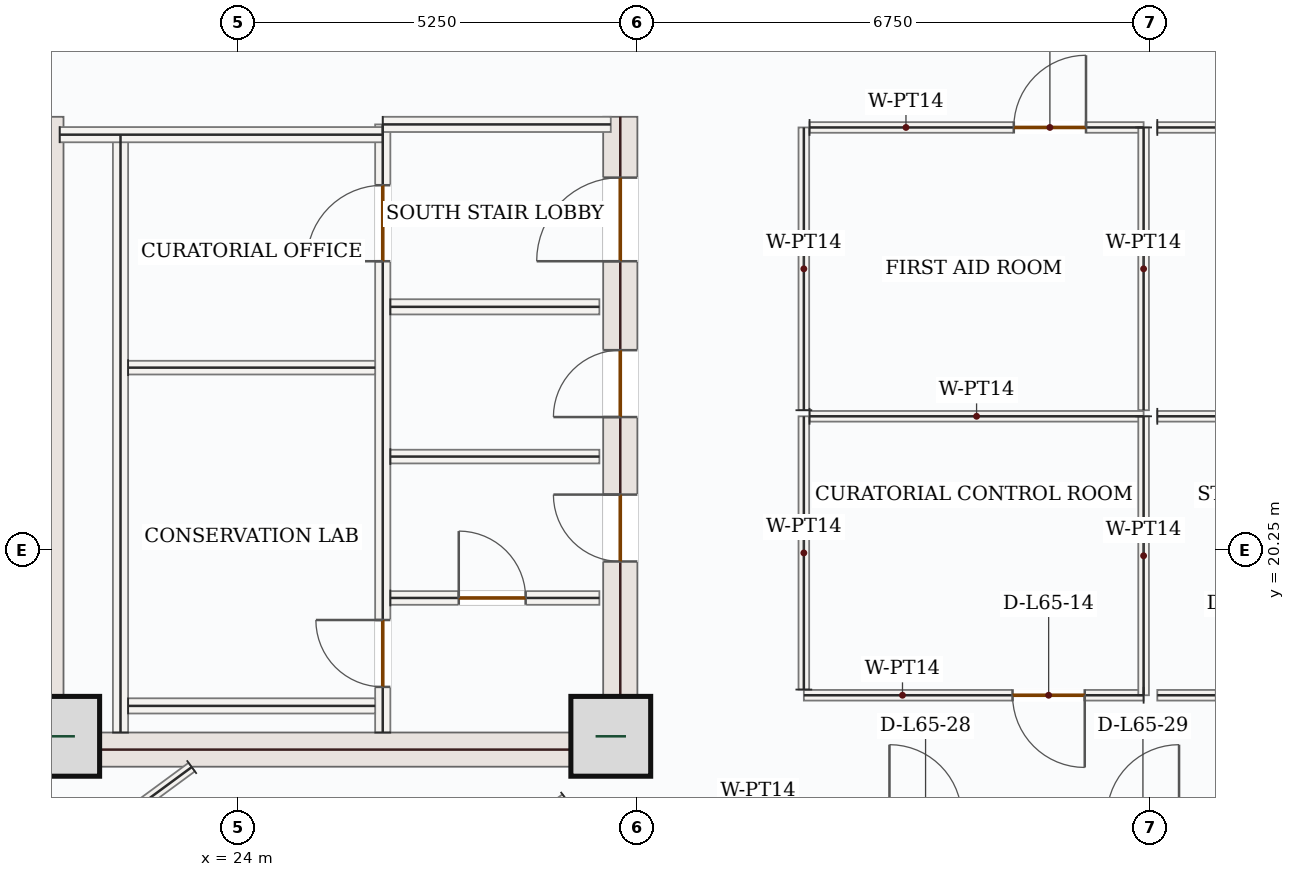
"""IFC4 building model, lengths in metres.
Left out: names, types, materials, properties, quantities, classifications, styles, units other than length and angle.
Written with IfcOpenShell. Run it as: python <this file> out.ifc"""

import sys

from ifc_helpers import new_model, si_unit, direction, frame, frame_2d, origin, origin_2d, place, context, subcontext, project, spatial, rectangle, extrude, source, transform, mapped, element, fill, save


model = new_model("IFC4")
c1 = context("Model", 3, precision=1e-05, world=origin(), true_north=direction((0.0, 1.0)))
c2 = subcontext(c1, "Body", "Model", "MODEL_VIEW")
j1 = project(units=[si_unit("LENGTHUNIT", "METRE"), si_unit("PLANEANGLEUNIT", "RADIAN")], contexts=[c1])
p1 = place(None, origin())
s1 = spatial("IfcSite", under=j1, at=p1, CompositionType="ELEMENT")
p2 = place(p1, origin())
s2 = spatial("IfcBuilding", under=s1, at=p2, CompositionType="ELEMENT")
p3 = place(p2, frame((0.0, 0.0, 272.85)))
s3 = spatial("IfcBuildingStorey", under=s2, at=p3, CompositionType="ELEMENT", Elevation=272.85)
m1 = source(origin(), c2, "Body", "SweptSolid", [
    extrude(rectangle(XDim=8.55, YDim=0.45, at=frame_2d((4.275, 0.0))), origin(), (0.0, 0.0, 1.0), 3.5),
])
p4 = place(p3, frame((21.475, 17.4, 0.0), z_axis=(0.0, 0.0, 1.0), x_axis=(0.0, 1.0, 0.0)))
e1 = element("IfcWall", 1, at=p4, inside=s3, PredefinedType="SHEAR", context=c2, shape_type="MappedRepresentation", body=[
    mapped(m1, transform((0.0, 0.0, 0.0), x_axis=(1.0, 0.0, 0.0), y_axis=(0.0, 1.0, 0.0), z_axis=(0.0, 0.0, 1.0), scale=1.0)),
])
p5 = place(p3, frame((29.025, 17.4, 0.0), z_axis=(0.0, 0.0, 1.0), x_axis=(0.0, 1.0, 0.0)))
e2 = element("IfcWall", 2, at=p5, inside=s3, PredefinedType="SHEAR", context=c2, shape_type="SweptSolid", body=[
    extrude(rectangle(XDim=8.55, YDim=0.45, at=frame_2d((4.275, 0.0))), origin(), (0.0, 0.0, 1.0), 3.5),
])
p6 = place(p5, frame((6.65, 0.0, 0.0)))
e3 = element("IfcOpeningElement", 3, at=p6, cuts=e2, PredefinedType="OPENING", context=c2, shape_type="SweptSolid", body=[
    extrude(rectangle(XDim=1.1, YDim=2.2, at=frame_2d((0.55, 1.1))), frame((0.0, 0.235, 0.0), z_axis=(0.0, -1.0, 0.0), x_axis=(1.0, 0.0, 0.0)), (0.0, 0.0, 1.0), 0.47),
])
p7 = place(p5, frame((2.7, 0.0, 0.0)))
e4 = element("IfcOpeningElement", 4, at=p7, cuts=e2, PredefinedType="OPENING", context=c2, shape_type="SweptSolid", body=[
    extrude(rectangle(XDim=0.88, YDim=2.1, at=frame_2d((0.44, 1.05))), frame((0.0, 0.235, 0.0), z_axis=(0.0, -1.0, 0.0), x_axis=(1.0, 0.0, 0.0)), (0.0, 0.0, 1.0), 0.47),
])
p8 = place(p5, frame((4.6, 0.0, 0.0)))
e5 = element("IfcOpeningElement", 5, at=p8, cuts=e2, PredefinedType="OPENING", context=c2, shape_type="SweptSolid", body=[
    extrude(rectangle(XDim=0.88, YDim=2.1, at=frame_2d((0.44, 1.05))), frame((0.0, 0.235, 0.0), z_axis=(0.0, -1.0, 0.0), x_axis=(1.0, 0.0, 0.0)), (0.0, 0.0, 1.0), 0.47),
])
m2 = source(origin(), c2, "Body", "SweptSolid", [
    extrude(rectangle(XDim=7.1, YDim=0.45, at=frame_2d((3.55, 0.0))), origin(), (0.0, 0.0, 1.0), 3.5),
])
p9 = place(p3, frame((21.7, 17.625, 0.0), z_axis=(0.0, 0.0, 1.0), x_axis=(1.0, 0.0, 0.0)))
e6 = element("IfcWall", 6, at=p9, inside=s3, PredefinedType="SHEAR", context=c2, shape_type="MappedRepresentation", body=[
    mapped(m2, transform((0.0, 0.0, 0.0), x_axis=(1.0, 0.0, 0.0), y_axis=(0.0, 1.0, 0.0), z_axis=(0.0, 0.0, 1.0), scale=1.0)),
])
m3 = source(origin(), c2, "Body", "SweptSolid", [
    extrude(rectangle(XDim=1.05, YDim=1.05, at=origin_2d()), origin(), (0.0, 0.0, 1.0), 3.75),
])
for number, where, z_axis, x_axis in (
    (7, (21.65, 17.8, 0.0), (0.0, 0.0, 1.0), (1.0, 0.0, 0.0)),
    (8, (28.9, 17.8, 0.0), (0.0, 0.0, 1.0), (1.0, 0.0, 0.0)),
):
    element("IfcColumn", number, at=place(p3, frame(where, z_axis=z_axis, x_axis=x_axis)), inside=s3, PredefinedType="COLUMN", context=c2, shape_type="MappedRepresentation", body=[
        mapped(m3, transform((0.0, 0.0, 0.0), x_axis=(1.0, 0.0, 0.0), y_axis=(0.0, 1.0, 0.0), z_axis=(0.0, 0.0, 1.0), scale=1.0)),
    ])
m4 = source(origin(), c2, "Body", "SweptSolid", [
    extrude(rectangle(XDim=7.87, YDim=0.2, at=frame_2d((3.935, 0.0))), origin(), (0.0, 0.0, 1.0), 3.5),
])
p10 = place(p3, frame((22.45, 17.85, 0.0), z_axis=(0.0, 0.0, 1.0), x_axis=(0.0, 1.0, 0.0)))
e9 = element("IfcWall", 9, at=p10, inside=s3, PredefinedType="SOLIDWALL", context=c2, shape_type="MappedRepresentation", body=[
    mapped(m4, transform((0.0, 0.0, 0.0), x_axis=(1.0, 0.0, 0.0), y_axis=(0.0, 1.0, 0.0), z_axis=(0.0, 0.0, 1.0), scale=1.0)),
])
p11 = place(p3, frame((25.9, 17.85, 0.0), z_axis=(0.0, 0.0, 1.0), x_axis=(0.0, 1.0, 0.0)))
e10 = element("IfcWall", 10, at=p11, inside=s3, PredefinedType="SOLIDWALL", context=c2, shape_type="SweptSolid", body=[
    extrude(rectangle(XDim=8.0, YDim=0.2, at=frame_2d((4.0, 0.0))), origin(), (0.0, 0.0, 1.0), 3.5),
])
p12 = place(p11, frame((6.2, 0.0, 0.0)))
e11 = element("IfcOpeningElement", 11, at=p12, cuts=e10, PredefinedType="OPENING", context=c2, shape_type="SweptSolid", body=[
    extrude(rectangle(XDim=1.0, YDim=2.15, at=frame_2d((0.5, 1.075))), frame((0.0, 0.11, 0.0), z_axis=(0.0, -1.0, 0.0), x_axis=(1.0, 0.0, 0.0)), (0.0, 0.0, 1.0), 0.22),
])
p13 = place(p11, frame((0.6, 0.0, 0.0)))
e12 = element("IfcOpeningElement", 12, at=p13, cuts=e10, PredefinedType="OPENING", context=c2, shape_type="SweptSolid", body=[
    extrude(rectangle(XDim=0.88, YDim=2.1, at=frame_2d((0.44, 1.05))), frame((0.0, 0.11, 0.0), z_axis=(0.0, -1.0, 0.0), x_axis=(1.0, 0.0, 0.0)), (0.0, 0.0, 1.0), 0.22),
])
m5 = source(origin(), c2, "Body", "SweptSolid", [
    extrude(rectangle(XDim=4.25, YDim=0.2, at=frame_2d((2.125, 0.0))), origin(), (0.0, 0.0, 1.0), 3.5),
])
p14 = place(p3, frame((21.65, 25.715, 0.0), z_axis=(0.0, 0.0, 1.0), x_axis=(1.0, 0.0, 0.0)))
e13 = element("IfcWall", 13, at=p14, inside=s3, PredefinedType="SOLIDWALL", context=c2, shape_type="MappedRepresentation", body=[
    mapped(m5, transform((0.0, 0.0, 0.0), x_axis=(1.0, 0.0, 0.0), y_axis=(0.0, 1.0, 0.0), z_axis=(0.0, 0.0, 1.0), scale=1.0)),
])
m6 = source(origin(), c2, "Body", "SweptSolid", [
    extrude(rectangle(XDim=3.0, YDim=0.2, at=frame_2d((1.5, 0.0))), origin(), (0.0, 0.0, 1.0), 3.5),
])
p15 = place(p3, frame((25.9, 25.85, 0.0), z_axis=(0.0, 0.0, 1.0), x_axis=(1.0, 0.0, 0.0)))
e14 = element("IfcWall", 14, at=p15, inside=s3, PredefinedType="SOLIDWALL", context=c2, shape_type="MappedRepresentation", body=[
    mapped(m6, transform((0.0, 0.0, 0.0), x_axis=(1.0, 0.0, 0.0), y_axis=(0.0, 1.0, 0.0), z_axis=(0.0, 0.0, 1.0), scale=1.0)),
])
m7 = source(origin(), c2, "Body", "SweptSolid", [
    extrude(rectangle(XDim=3.25, YDim=0.2, at=frame_2d((1.625, 0.0))), origin(), (0.0, 0.0, 1.0), 3.5),
])
p16 = place(p3, frame((22.55, 18.2, 0.0), z_axis=(0.0, 0.0, 1.0), x_axis=(1.0, 0.0, 0.0)))
e15 = element("IfcWall", 15, at=p16, inside=s3, PredefinedType="SOLIDWALL", context=c2, shape_type="MappedRepresentation", body=[
    mapped(m7, transform((0.0, 0.0, 0.0), x_axis=(1.0, 0.0, 0.0), y_axis=(0.0, 1.0, 0.0), z_axis=(0.0, 0.0, 1.0), scale=1.0)),
])
m8 = source(origin(), c2, "Body", "SweptSolid", [
    extrude(rectangle(XDim=3.25, YDim=0.18, at=frame_2d((1.625, 0.0))), origin(), (0.0, 0.0, 1.0), 3.5),
])
p17 = place(p3, frame((22.55, 22.65, 0.0), z_axis=(0.0, 0.0, 1.0), x_axis=(1.0, 0.0, 0.0)))
e16 = element("IfcWall", 16, at=p17, inside=s3, PredefinedType="PARTITIONING", context=c2, shape_type="MappedRepresentation", body=[
    mapped(m8, transform((0.0, 0.0, 0.0), x_axis=(1.0, 0.0, 0.0), y_axis=(0.0, 1.0, 0.0), z_axis=(0.0, 0.0, 1.0), scale=1.0)),
])
m9 = source(origin(), c2, "Body", "SweptSolid", [
    extrude(rectangle(XDim=2.75, YDim=0.2, at=frame_2d((1.375, 0.0))), origin(), (0.0, 0.0, 1.0), 3.5),
])
p18 = place(p3, frame((26.0, 23.45, 0.0), z_axis=(0.0, 0.0, 1.0), x_axis=(1.0, 0.0, 0.0)))
e17 = element("IfcWall", 17, at=p18, inside=s3, PredefinedType="SOLIDWALL", context=c2, shape_type="MappedRepresentation", body=[
    mapped(m9, transform((0.0, 0.0, 0.0), x_axis=(1.0, 0.0, 0.0), y_axis=(0.0, 1.0, 0.0), z_axis=(0.0, 0.0, 1.0), scale=1.0)),
])
p19 = place(p3, frame((26.0, 19.62, 0.0), z_axis=(0.0, 0.0, 1.0), x_axis=(1.0, 0.0, 0.0)))
e18 = element("IfcWall", 18, at=p19, inside=s3, PredefinedType="PARTITIONING", context=c2, shape_type="SweptSolid", body=[
    extrude(rectangle(XDim=2.75, YDim=0.18, at=frame_2d((1.375, 0.0))), origin(), (0.0, 0.0, 1.0), 3.5),
])
p20 = place(p19, frame((0.9, 0.0, 0.0)))
e19 = element("IfcOpeningElement", 19, at=p20, cuts=e18, PredefinedType="OPENING", context=c2, shape_type="SweptSolid", body=[
    extrude(rectangle(XDim=0.88, YDim=2.1, at=frame_2d((0.44, 1.05))), frame((0.0, 0.1, 0.0), z_axis=(0.0, -1.0, 0.0), x_axis=(1.0, 0.0, 0.0)), (0.0, 0.0, 1.0), 0.2),
])
m10 = source(origin(), c2, "Body", "SweptSolid", [
    extrude(rectangle(XDim=2.75, YDim=0.18, at=frame_2d((1.375, 0.0))), origin(), (0.0, 0.0, 1.0), 3.5),
])
p21 = place(p3, frame((26.0, 21.48, 0.0), z_axis=(0.0, 0.0, 1.0), x_axis=(1.0, 0.0, 0.0)))
e20 = element("IfcWall", 20, at=p21, inside=s3, PredefinedType="PARTITIONING", context=c2, shape_type="MappedRepresentation", body=[
    mapped(m10, transform((0.0, 0.0, 0.0), x_axis=(1.0, 0.0, 0.0), y_axis=(0.0, 1.0, 0.0), z_axis=(0.0, 0.0, 1.0), scale=1.0)),
])
p22 = place(p3, frame((35.91, 18.34, 0.0), z_axis=(0.0, 0.0, 1.0), x_axis=(-1.0, 0.0, 0.0)))
e21 = element("IfcWall", 21, at=p22, inside=s3, PredefinedType="PARTITIONING", context=c2, shape_type="SweptSolid", body=[
    extrude(rectangle(XDim=4.47, YDim=0.14, at=frame_2d((2.235, 0.0))), origin(), (0.0, 0.0, 1.0), 3.5),
])
p23 = place(p22, frame((0.774, 0.0, 0.0)))
e22 = element("IfcOpeningElement", 22, at=p23, cuts=e21, PredefinedType="OPENING", context=c2, shape_type="SweptSolid", body=[
    extrude(rectangle(XDim=0.95, YDim=2.15, at=frame_2d((0.475, 1.075))), frame((0.0, 0.08, 0.0), z_axis=(0.0, -1.0, 0.0), x_axis=(1.0, 0.0, 0.0)), (0.0, 0.0, 1.0), 0.16),
])
m11 = source(origin(), c2, "Body", "SweptSolid", [
    extrude(rectangle(XDim=3.595, YDim=0.14, at=frame_2d((1.797, 0.0))), origin(), (0.0, 0.0, 1.0), 3.5),
])
p24 = place(p3, frame((31.44, 18.415, 0.0), z_axis=(0.0, 0.0, 1.0), x_axis=(0.0, 1.0, 0.0)))
e23 = element("IfcWall", 23, at=p24, inside=s3, PredefinedType="PARTITIONING", context=c2, shape_type="MappedRepresentation", body=[
    mapped(m11, transform((0.0, 0.0, 0.0), x_axis=(1.0, 0.0, 0.0), y_axis=(0.0, 1.0, 0.0), z_axis=(0.0, 0.0, 1.0), scale=1.0)),
])
m12 = source(origin(), c2, "Body", "SweptSolid", [
    extrude(rectangle(XDim=4.395, YDim=0.14, at=frame_2d((2.198, 0.0))), origin(), (0.0, 0.0, 1.0), 3.5),
])
p25 = place(p3, frame((31.515, 22.01, 0.0), z_axis=(0.0, 0.0, 1.0), x_axis=(1.0, 0.0, 0.0)))
e24 = element("IfcWall", 24, at=p25, inside=s3, PredefinedType="PARTITIONING", context=c2, shape_type="MappedRepresentation", body=[
    mapped(m12, transform((0.0, 0.0, 0.0), x_axis=(1.0, 0.0, 0.0), y_axis=(0.0, 1.0, 0.0), z_axis=(0.0, 0.0, 1.0), scale=1.0)),
])
m13 = source(origin(), c2, "Body", "SweptSolid", [
    extrude(rectangle(XDim=3.67, YDim=0.14, at=frame_2d((1.835, 0.0))), origin(), (0.0, 0.0, 1.0), 3.5),
])
p26 = place(p3, frame((35.91, 22.01, 0.0), z_axis=(0.0, 0.0, 1.0), x_axis=(0.0, -1.0, 0.0)))
e25 = element("IfcWall", 25, at=p26, inside=s3, PredefinedType="PARTITIONING", context=c2, shape_type="MappedRepresentation", body=[
    mapped(m13, transform((0.0, 0.0, 0.0), x_axis=(1.0, 0.0, 0.0), y_axis=(0.0, 1.0, 0.0), z_axis=(0.0, 0.0, 1.0), scale=1.0)),
])
p27 = place(p3, frame((40.56, 18.34, 0.0), z_axis=(0.0, 0.0, 1.0), x_axis=(-1.0, 0.0, 0.0)))
e26 = element("IfcWall", 26, at=p27, inside=s3, PredefinedType="PARTITIONING", context=c2, shape_type="SweptSolid", body=[
    extrude(rectangle(XDim=4.47, YDim=0.14, at=frame_2d((2.235, 0.0))), origin(), (0.0, 0.0, 1.0), 3.5),
])
p28 = place(p27, frame((2.746, 0.0, 0.0)))
e27 = element("IfcOpeningElement", 27, at=p28, cuts=e26, PredefinedType="OPENING", context=c2, shape_type="SweptSolid", body=[
    extrude(rectangle(XDim=0.95, YDim=2.15, at=frame_2d((0.475, 1.075))), frame((0.0, 0.08, 0.0), z_axis=(0.0, -1.0, 0.0), x_axis=(1.0, 0.0, 0.0)), (0.0, 0.0, 1.0), 0.16),
])
m14 = source(origin(), c2, "Body", "SweptSolid", [
    extrude(rectangle(XDim=4.47, YDim=0.14, at=frame_2d((2.235, 0.0))), origin(), (0.0, 0.0, 1.0), 3.5),
])
p29 = place(p3, frame((36.09, 22.01, 0.0), z_axis=(0.0, 0.0, 1.0), x_axis=(1.0, 0.0, 0.0)))
e28 = element("IfcWall", 28, at=p29, inside=s3, PredefinedType="PARTITIONING", context=c2, shape_type="MappedRepresentation", body=[
    mapped(m14, transform((0.0, 0.0, 0.0), x_axis=(1.0, 0.0, 0.0), y_axis=(0.0, 1.0, 0.0), z_axis=(0.0, 0.0, 1.0), scale=1.0)),
])
m15 = source(origin(), c2, "Body", "SweptSolid", [
    extrude(rectangle(XDim=3.72, YDim=0.14, at=frame_2d((1.86, 0.0))), origin(), (0.0, 0.0, 1.0), 3.5),
])
p30 = place(p3, frame((31.44, 22.09, 0.0), z_axis=(0.0, 0.0, 1.0), x_axis=(0.0, 1.0, 0.0)))
e29 = element("IfcWall", 29, at=p30, inside=s3, PredefinedType="PARTITIONING", context=c2, shape_type="MappedRepresentation", body=[
    mapped(m15, transform((0.0, 0.0, 0.0), x_axis=(1.0, 0.0, 0.0), y_axis=(0.0, 1.0, 0.0), z_axis=(0.0, 0.0, 1.0), scale=1.0)),
])
p31 = place(p3, frame((31.515, 25.81, 0.0), z_axis=(0.0, 0.0, 1.0), x_axis=(1.0, 0.0, 0.0)))
e30 = element("IfcWall", 30, at=p31, inside=s3, PredefinedType="PARTITIONING", context=c2, shape_type="SweptSolid", body=[
    extrude(rectangle(XDim=4.395, YDim=0.14, at=frame_2d((2.198, 0.0))), origin(), (0.0, 0.0, 1.0), 3.5),
])
p32 = place(p31, frame((2.687, 0.0, 0.0)))
e31 = element("IfcOpeningElement", 31, at=p32, cuts=e30, PredefinedType="OPENING", context=c2, shape_type="SweptSolid", body=[
    extrude(rectangle(XDim=0.95, YDim=2.15, at=frame_2d((0.475, 1.075))), frame((0.0, 0.08, 0.0), z_axis=(0.0, -1.0, 0.0), x_axis=(1.0, 0.0, 0.0)), (0.0, 0.0, 1.0), 0.16),
])
p33 = place(p3, frame((35.91, 25.81, 0.0), z_axis=(0.0, 0.0, 1.0), x_axis=(0.0, -1.0, 0.0)))
e32 = element("IfcWall", 32, at=p33, inside=s3, PredefinedType="PARTITIONING", context=c2, shape_type="MappedRepresentation", body=[
    mapped(m15, transform((0.0, 0.0, 0.0), x_axis=(1.0, 0.0, 0.0), y_axis=(0.0, 1.0, 0.0), z_axis=(0.0, 0.0, 1.0), scale=1.0)),
])
p34 = place(p3, frame((36.09, 25.81, 0.0), z_axis=(0.0, 0.0, 1.0), x_axis=(1.0, 0.0, 0.0)))
e33 = element("IfcWall", 33, at=p34, inside=s3, PredefinedType="PARTITIONING", context=c2, shape_type="SweptSolid", body=[
    extrude(rectangle(XDim=4.47, YDim=0.14, at=frame_2d((2.235, 0.0))), origin(), (0.0, 0.0, 1.0), 3.5),
])
p35 = place(p34, frame((0.774, 0.0, 0.0)))
e34 = element("IfcOpeningElement", 34, at=p35, cuts=e33, PredefinedType="OPENING", context=c2, shape_type="SweptSolid", body=[
    extrude(rectangle(XDim=0.95, YDim=2.15, at=frame_2d((0.475, 1.075))), frame((0.0, 0.08, 0.0), z_axis=(0.0, -1.0, 0.0), x_axis=(1.0, 0.0, 0.0)), (0.0, 0.0, 1.0), 0.16),
])
m16 = source(origin(), c2, "Body", "SweptSolid", [
    extrude(rectangle(XDim=6.063, YDim=0.14, at=frame_2d((3.032, 0.0))), origin(), (0.0, 0.0, 1.0), 3.5),
])
p36 = place(p3, frame((23.387, 17.395, 0.0), z_axis=(0.0, 0.0, 1.0), x_axis=(-0.805422045282, -0.59270172007, 0.0)))
e35 = element("IfcWall", 35, at=p36, inside=s3, PredefinedType="PARTITIONING", context=c2, shape_type="MappedRepresentation", body=[
    mapped(m16, transform((0.0, 0.0, 0.0), x_axis=(1.0, 0.0, 0.0), y_axis=(0.0, 1.0, 0.0), z_axis=(0.0, 0.0, 1.0), scale=1.0)),
])
m17 = source(origin(), c2, "Body", "SweptSolid", [
    extrude(rectangle(XDim=2.985, YDim=0.14, at=frame_2d((1.492, 0.0))), origin(), (0.0, 0.0, 1.0), 2.713),
])
p37 = place(p3, frame((28.306, 16.98, 0.0), z_axis=(0.0, 0.0, 1.0), x_axis=(-0.80539491033, -0.592738591973, 0.0)))
e36 = element("IfcWall", 36, at=p37, inside=s3, PredefinedType="PARTITIONING", context=c2, shape_type="MappedRepresentation", body=[
    mapped(m17, transform((0.0, 0.0, 0.0), x_axis=(1.0, 0.0, 0.0), y_axis=(0.0, 1.0, 0.0), z_axis=(0.0, 0.0, 1.0), scale=1.0)),
])
m18 = source(origin(), c2, "Body", "SweptSolid", [
    extrude(rectangle(XDim=1.0, YDim=2.15, at=frame_2d((0.5, 1.075))), frame((0.0, 0.025, 0.0), z_axis=(0.0, -1.0, 0.0), x_axis=(1.0, 0.0, 0.0)), (0.0, 0.0, 1.0), 0.05),
])
p38 = place(p12, origin())
e37 = element("IfcDoor", 37, at=p38, inside=s3, OperationType="SINGLE_SWING_LEFT", PredefinedType="DOOR", context=c2, shape_type="MappedRepresentation", body=[
    mapped(m18, transform((0.0, 0.0, 0.0), x_axis=(1.0, 0.0, 0.0), y_axis=(0.0, 1.0, 0.0), z_axis=(0.0, 0.0, 1.0), scale=1.0)),
])
fill(e11, e37)
m19 = source(origin(), c2, "Body", "SweptSolid", [
    extrude(rectangle(XDim=0.88, YDim=2.1, at=frame_2d((0.44, 1.05))), frame((0.0, 0.025, 0.0), z_axis=(0.0, -1.0, 0.0), x_axis=(1.0, 0.0, 0.0)), (0.0, 0.0, 1.0), 0.05),
])
p39 = place(p13, origin())
e38 = element("IfcDoor", 38, at=p39, inside=s3, OperationType="SINGLE_SWING_RIGHT", PredefinedType="DOOR", context=c2, shape_type="MappedRepresentation", body=[
    mapped(m19, transform((0.0, 0.0, 0.0), x_axis=(1.0, 0.0, 0.0), y_axis=(0.0, 1.0, 0.0), z_axis=(0.0, 0.0, 1.0), scale=1.0)),
])
fill(e12, e38)
m20 = source(origin(), c2, "Body", "SweptSolid", [
    extrude(rectangle(XDim=1.1, YDim=2.2, at=frame_2d((0.55, 1.1))), frame((0.0, 0.025, 0.0), z_axis=(0.0, -1.0, 0.0), x_axis=(1.0, 0.0, 0.0)), (0.0, 0.0, 1.0), 0.05),
])
p40 = place(p6, origin())
e39 = element("IfcDoor", 39, at=p40, inside=s3, OperationType="SINGLE_SWING_LEFT", PredefinedType="DOOR", context=c2, shape_type="MappedRepresentation", body=[
    mapped(m20, transform((0.0, 0.0, 0.0), x_axis=(1.0, 0.0, 0.0), y_axis=(0.0, 1.0, 0.0), z_axis=(0.0, 0.0, 1.0), scale=1.0)),
])
fill(e3, e39)
p41 = place(p20, origin())
e40 = element("IfcDoor", 40, at=p41, inside=s3, OperationType="SINGLE_SWING_LEFT", PredefinedType="DOOR", context=c2, shape_type="MappedRepresentation", body=[
    mapped(m19, transform((0.0, 0.0, 0.0), x_axis=(1.0, 0.0, 0.0), y_axis=(0.0, 1.0, 0.0), z_axis=(0.0, 0.0, 1.0), scale=1.0)),
])
fill(e19, e40)
p42 = place(p7, origin())
e41 = element("IfcDoor", 41, at=p42, inside=s3, OperationType="SINGLE_SWING_RIGHT", PredefinedType="DOOR", context=c2, shape_type="MappedRepresentation", body=[
    mapped(m19, transform((0.0, 0.0, 0.0), x_axis=(1.0, 0.0, 0.0), y_axis=(0.0, 1.0, 0.0), z_axis=(0.0, 0.0, 1.0), scale=1.0)),
])
fill(e4, e41)
p43 = place(p8, origin())
e42 = element("IfcDoor", 42, at=p43, inside=s3, OperationType="SINGLE_SWING_LEFT", PredefinedType="DOOR", context=c2, shape_type="MappedRepresentation", body=[
    mapped(m19, transform((0.0, 0.0, 0.0), x_axis=(1.0, 0.0, 0.0), y_axis=(0.0, 1.0, 0.0), z_axis=(0.0, 0.0, 1.0), scale=1.0)),
])
fill(e5, e42)
m21 = source(origin(), c2, "Body", "SweptSolid", [
    extrude(rectangle(XDim=0.95, YDim=2.15, at=frame_2d((0.475, 1.075))), frame((0.0, 0.025, 0.0), z_axis=(0.0, -1.0, 0.0), x_axis=(1.0, 0.0, 0.0)), (0.0, 0.0, 1.0), 0.05),
])
p44 = place(p23, origin())
e43 = element("IfcDoor", 43, at=p44, inside=s3, OperationType="SINGLE_SWING_LEFT", PredefinedType="DOOR", context=c2, shape_type="MappedRepresentation", body=[
    mapped(m21, transform((0.0, 0.0, 0.0), x_axis=(1.0, 0.0, 0.0), y_axis=(0.0, 1.0, 0.0), z_axis=(0.0, 0.0, 1.0), scale=1.0)),
])
fill(e22, e43)
p45 = place(p32, origin())
e44 = element("IfcDoor", 44, at=p45, inside=s3, OperationType="SINGLE_SWING_RIGHT", PredefinedType="DOOR", context=c2, shape_type="MappedRepresentation", body=[
    mapped(m21, transform((0.0, 0.0, 0.0), x_axis=(1.0, 0.0, 0.0), y_axis=(0.0, 1.0, 0.0), z_axis=(0.0, 0.0, 1.0), scale=1.0)),
])
fill(e31, e44)
save(model, sys.argv[1])
